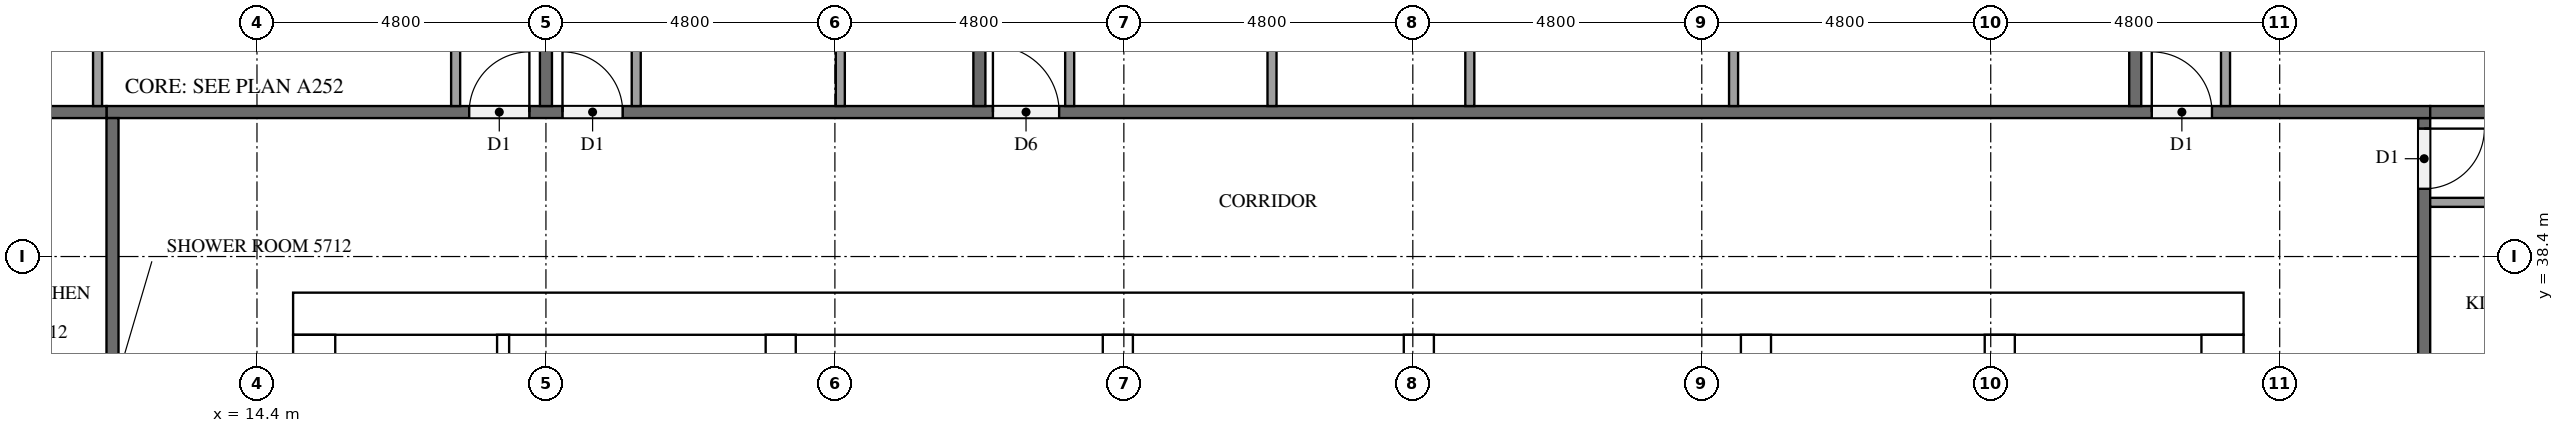
"""IFC4 building model, lengths in metres.
Left out: names, types, materials, properties, quantities, classifications, styles, units other than length and angle.
Written with IfcOpenShell. Run it as: python <this file> out.ifc"""

import sys

from ifc_helpers import new_model, si_unit, direction, frame, frame_2d, origin, place, context, subcontext, project, spatial, rectangle, extrude, element, fill, save


model = new_model("IFC4")
c1 = context("Model", 3, precision=1e-05, world=origin(), true_north=direction((0.0, 1.0)))
c2 = subcontext(c1, "Body", "Model", "MODEL_VIEW")
j1 = project(units=[si_unit("LENGTHUNIT", "METRE"), si_unit("PLANEANGLEUNIT", "RADIAN")], contexts=[c1])
p1 = place(None, origin())
s1 = spatial("IfcSite", under=j1, at=p1, CompositionType="ELEMENT")
p2 = place(p1, origin())
s2 = spatial("IfcBuilding", under=s1, at=p2, CompositionType="ELEMENT")
p3 = place(p2, frame((0.0, 0.0, 219.3)))
s3 = spatial("IfcBuildingStorey", under=s2, at=p3, CompositionType="ELEMENT", Elevation=219.3)
p4 = place(p3, frame((15.0, 37.45, 0.0), z_axis=(0.0, 0.0, 1.0), x_axis=(1.0, 0.0, 0.0)))
e1 = element("IfcWall", 1, at=p4, inside=s3, PredefinedType="SHEAR", context=c2, shape_type="SweptSolid", body=[
    extrude(rectangle(XDim=32.4, YDim=0.7, at=frame_2d((16.2, 0.0))), origin(), (0.0, 0.0, 1.0), 3.2),
])
p5 = place(p4, frame((15.3, 0.0, 0.0)))
e2 = element("IfcOpeningElement", 2, at=p5, cuts=e1, PredefinedType="OPENING", context=c2, shape_type="SweptSolid", body=[
    extrude(rectangle(XDim=1.8, YDim=2.1, at=frame_2d((0.9, 1.05))), frame((0.0, 0.36, 0.0), z_axis=(0.0, -1.0, 0.0), x_axis=(1.0, 0.0, 0.0)), (0.0, 0.0, 1.0), 0.72),
])
p6 = place(p4, frame((1.544, 0.0, 0.0)))
e3 = element("IfcOpeningElement", 3, at=p6, cuts=e1, PredefinedType="OPENING", context=c2, shape_type="SweptSolid", body=[
    extrude(rectangle(XDim=1.0, YDim=2.1, at=frame_2d((0.5, 1.05))), frame((0.0, 0.36, 0.0), z_axis=(0.0, -1.0, 0.0), x_axis=(1.0, 0.0, 0.0)), (0.0, 0.0, 1.0), 0.72),
])
p7 = place(p4, frame((5.219, 0.0, 0.0)))
e4 = element("IfcOpeningElement", 4, at=p7, cuts=e1, PredefinedType="OPENING", context=c2, shape_type="SweptSolid", body=[
    extrude(rectangle(XDim=1.0, YDim=2.1, at=frame_2d((0.5, 1.05))), frame((0.0, 0.36, 0.0), z_axis=(0.0, -1.0, 0.0), x_axis=(1.0, 0.0, 0.0)), (0.0, 0.0, 1.0), 0.72),
])
p8 = place(p3, frame((15.35, 15.7, 0.0), z_axis=(0.0, 0.0, 1.0), x_axis=(0.0, 1.0, 0.0)))
e5 = element("IfcWall", 5, at=p8, inside=s3, PredefinedType="SHEAR", context=c2, shape_type="SweptSolid", body=[
    extrude(rectangle(XDim=21.4, YDim=0.7, at=frame_2d((10.7, 0.0))), origin(), (0.0, 0.0, 1.0), 3.2),
])
p9 = place(p8, frame((5.06, 0.0, 0.0)))
e6 = element("IfcOpeningElement", 6, at=p9, cuts=e5, PredefinedType="OPENING", context=c2, shape_type="SweptSolid", body=[
    extrude(rectangle(XDim=1.2, YDim=2.1, at=frame_2d((0.6, 1.05))), frame((0.0, 0.36, 0.0), z_axis=(0.0, -1.0, 0.0), x_axis=(1.0, 0.0, 0.0)), (0.0, 0.0, 1.0), 0.72),
])
p10 = place(p3, frame((47.05, 15.7, 0.0), z_axis=(0.0, 0.0, 1.0), x_axis=(0.0, 1.0, 0.0)))
e7 = element("IfcWall", 7, at=p10, inside=s3, PredefinedType="SHEAR", context=c2, shape_type="SweptSolid", body=[
    extrude(rectangle(XDim=21.4, YDim=0.7, at=frame_2d((10.7, 0.0))), origin(), (0.0, 0.0, 1.0), 3.2),
])
p11 = place(p10, frame((10.4, 0.0, 0.0)))
e8 = element("IfcOpeningElement", 8, at=p11, cuts=e7, PredefinedType="OPENING", context=c2, shape_type="SweptSolid", body=[
    extrude(rectangle(XDim=1.2, YDim=2.1, at=frame_2d((0.6, 1.05))), frame((0.0, 0.36, 0.0), z_axis=(0.0, -1.0, 0.0), x_axis=(1.0, 0.0, 0.0)), (0.0, 0.0, 1.0), 0.72),
])
p12 = place(p3, frame((23.1, 15.7, 0.0), z_axis=(0.0, 0.0, 1.0), x_axis=(0.0, 1.0, 0.0)))
e9 = element("IfcWall", 9, at=p12, inside=s3, PredefinedType="SHEAR", context=c2, shape_type="SweptSolid", body=[
    extrude(rectangle(XDim=21.4, YDim=0.5, at=frame_2d((10.7, 0.0))), origin(), (0.0, 0.0, 1.0), 3.2),
])
p13 = place(p3, frame((39.3, 27.75, 0.0), z_axis=(0.0, 0.0, 1.0), x_axis=(0.0, 1.0, 0.0)))
e10 = element("IfcWall", 10, at=p13, inside=s3, PredefinedType="SHEAR", context=c2, shape_type="SweptSolid", body=[
    extrude(rectangle(XDim=9.35, YDim=0.5, at=frame_2d((4.675, 0.0))), origin(), (0.0, 0.0, 1.0), 3.2),
])
p14 = place(p3, frame((43.35, 27.75, 0.0), z_axis=(0.0, 0.0, 1.0), x_axis=(0.0, 1.0, 0.0)))
e11 = element("IfcWall", 11, at=p14, inside=s3, PredefinedType="SHEAR", context=c2, shape_type="SweptSolid", body=[
    extrude(rectangle(XDim=9.35, YDim=0.5, at=frame_2d((4.675, 0.0))), origin(), (0.0, 0.0, 1.0), 3.2),
])
p15 = place(p14, frame((7.65, 0.0, 0.0)))
e12 = element("IfcOpeningElement", 12, at=p15, cuts=e11, PredefinedType="OPENING", context=c2, shape_type="SweptSolid", body=[
    extrude(rectangle(XDim=1.2, YDim=2.1, at=frame_2d((0.6, 1.05))), frame((0.0, 0.26, 0.0), z_axis=(0.0, -1.0, 0.0), x_axis=(1.0, 0.0, 0.0)), (0.0, 0.0, 1.0), 0.52),
])
for number, where, z_axis, x_axis in (
    (13, (28.7, 33.8, 0.0), (0.0, 0.0, 1.0), (0.0, 1.0, 0.0)),
    (14, (33.7, 33.8, 0.0), (0.0, 0.0, 1.0), (0.0, 1.0, 0.0)),
):
    element("IfcWall", number, at=place(p3, frame(where, z_axis=z_axis, x_axis=x_axis)), inside=s3, PredefinedType="SHEAR", context=c2, shape_type="SweptSolid", body=[
        extrude(rectangle(XDim=3.3, YDim=0.5, at=frame_2d((1.65, 0.0))), origin(), (0.0, 0.0, 1.0), 3.2),
    ])
p16 = place(p3, frame((18.489, 31.5, 0.0), z_axis=(0.0, 0.0, 1.0), x_axis=(0.0, 1.0, 0.0)))
e15 = element("IfcWall", 15, at=p16, inside=s3, PredefinedType="PARTITIONING", context=c2, shape_type="SweptSolid", body=[
    extrude(rectangle(XDim=5.6, YDim=0.2, at=frame_2d((2.8, 0.0))), origin(), (0.0, 0.0, 1.0), 3.2),
])
p17 = place(p3, frame((50.4, 40.7, 0.0), z_axis=(0.0, 0.0, 1.0), x_axis=(0.0, -1.0, 0.0)))
e16 = element("IfcWall", 16, at=p17, inside=s3, PredefinedType="PARTITIONING", context=c2, shape_type="SweptSolid", body=[
    extrude(rectangle(XDim=28.6, YDim=0.2, at=frame_2d((14.3, 0.0))), origin(), (0.0, 0.0, 1.0), 3.2),
])
p18 = place(p17, frame((21.775, 0.0, 0.0)))
e17 = element("IfcOpeningElement", 17, at=p18, cuts=e16, PredefinedType="OPENING", context=c2, shape_type="SweptSolid", body=[
    extrude(rectangle(XDim=1.0, YDim=2.1, at=frame_2d((0.5, 1.05))), frame((0.0, 0.11, 0.0), z_axis=(0.0, -1.0, 0.0), x_axis=(1.0, 0.0, 0.0)), (0.0, 0.0, 1.0), 0.22),
])
p19 = place(p17, frame((7.375, 0.0, 0.0)))
e18 = element("IfcOpeningElement", 18, at=p19, cuts=e16, PredefinedType="OPENING", context=c2, shape_type="SweptSolid", body=[
    extrude(rectangle(XDim=1.0, YDim=2.1, at=frame_2d((0.5, 1.05))), frame((0.0, 0.11, 0.0), z_axis=(0.0, -1.0, 0.0), x_axis=(1.0, 0.0, 0.0)), (0.0, 0.0, 1.0), 0.22),
])
p20 = place(p17, frame((0.175, 0.0, 0.0)))
e19 = element("IfcOpeningElement", 19, at=p20, cuts=e16, PredefinedType="OPENING", context=c2, shape_type="SweptSolid", body=[
    extrude(rectangle(XDim=1.0, YDim=2.1, at=frame_2d((0.5, 1.05))), frame((0.0, 0.11, 0.0), z_axis=(0.0, -1.0, 0.0), x_axis=(1.0, 0.0, 0.0)), (0.0, 0.0, 1.0), 0.22),
])
p21 = place(p3, frame((11.9, 40.8, 0.0), z_axis=(0.0, 0.0, 1.0), x_axis=(1.0, 0.0, 0.0)))
e20 = element("IfcWall", 20, at=p21, inside=s3, PredefinedType="PARTITIONING", context=c2, shape_type="SweptSolid", body=[
    extrude(rectangle(XDim=38.6, YDim=0.2, at=frame_2d((19.3, 0.0))), origin(), (0.0, 0.0, 1.0), 3.2),
])
p22 = place(p21, frame((33.975, 0.0, 0.0)))
e21 = element("IfcOpeningElement", 21, at=p22, cuts=e20, PredefinedType="OPENING", context=c2, shape_type="SweptSolid", body=[
    extrude(rectangle(XDim=1.0, YDim=2.1, at=frame_2d((0.5, 1.05))), frame((0.0, 0.11, 0.0), z_axis=(0.0, -1.0, 0.0), x_axis=(1.0, 0.0, 0.0)), (0.0, 0.0, 1.0), 0.22),
])
p23 = place(p21, frame((14.725, 0.0, 0.0)))
e22 = element("IfcOpeningElement", 22, at=p23, cuts=e20, PredefinedType="OPENING", context=c2, shape_type="SweptSolid", body=[
    extrude(rectangle(XDim=1.1, YDim=2.1, at=frame_2d((0.55, 1.05))), frame((0.0, 0.11, 0.0), z_axis=(0.0, -1.0, 0.0), x_axis=(1.0, 0.0, 0.0)), (0.0, 0.0, 1.0), 0.22),
])
p24 = place(p21, frame((7.575, 0.0, 0.0)))
e23 = element("IfcOpeningElement", 23, at=p24, cuts=e20, PredefinedType="OPENING", context=c2, shape_type="SweptSolid", body=[
    extrude(rectangle(XDim=1.0, YDim=2.1, at=frame_2d((0.5, 1.05))), frame((0.0, 0.11, 0.0), z_axis=(0.0, -1.0, 0.0), x_axis=(1.0, 0.0, 0.0)), (0.0, 0.0, 1.0), 0.22),
])
p25 = place(p21, frame((6.025, 0.0, 0.0)))
e24 = element("IfcOpeningElement", 24, at=p25, cuts=e20, PredefinedType="OPENING", context=c2, shape_type="SweptSolid", body=[
    extrude(rectangle(XDim=1.0, YDim=2.1, at=frame_2d((0.5, 1.05))), frame((0.0, 0.11, 0.0), z_axis=(0.0, -1.0, 0.0), x_axis=(1.0, 0.0, 0.0)), (0.0, 0.0, 1.0), 0.22),
])
p26 = place(p3, frame((12.0, 12.1, 0.0), z_axis=(0.0, 0.0, 1.0), x_axis=(0.0, 1.0, 0.0)))
e25 = element("IfcWall", 25, at=p26, inside=s3, PredefinedType="PARTITIONING", context=c2, shape_type="SweptSolid", body=[
    extrude(rectangle(XDim=28.6, YDim=0.2, at=frame_2d((14.3, 0.0))), origin(), (0.0, 0.0, 1.0), 3.2),
])
p27 = place(p26, frame((9.725, 0.0, 0.0)))
e26 = element("IfcOpeningElement", 26, at=p27, cuts=e25, PredefinedType="OPENING", context=c2, shape_type="SweptSolid", body=[
    extrude(rectangle(XDim=1.1, YDim=2.1, at=frame_2d((0.55, 1.05))), frame((0.0, 0.11, 0.0), z_axis=(0.0, -1.0, 0.0), x_axis=(1.0, 0.0, 0.0)), (0.0, 0.0, 1.0), 0.22),
])
p28 = place(p26, frame((0.175, 0.0, 0.0)))
e27 = element("IfcOpeningElement", 27, at=p28, cuts=e25, PredefinedType="OPENING", context=c2, shape_type="SweptSolid", body=[
    extrude(rectangle(XDim=1.0, YDim=2.1, at=frame_2d((0.5, 1.05))), frame((0.0, 0.11, 0.0), z_axis=(0.0, -1.0, 0.0), x_axis=(1.0, 0.0, 0.0)), (0.0, 0.0, 1.0), 0.22),
])
for number, where, z_axis, x_axis in (
    (28, (50.5, 40.8, 0.0), (0.0, 0.0, 1.0), (1.0, 0.0, 0.0)),
    (29, (45.6, 52.7, 0.0), (0.0, 0.0, 1.0), (0.0, -1.0, 0.0)),
    (30, (26.4, 52.7, 0.0), (0.0, 0.0, 1.0), (0.0, -1.0, 0.0)),
):
    element("IfcWall", number, at=place(p3, frame(where, z_axis=z_axis, x_axis=x_axis)), inside=s3, PredefinedType="PARTITIONING", context=c2, shape_type="SweptSolid", body=[
        extrude(rectangle(XDim=11.8, YDim=0.2, at=frame_2d((5.9, 0.0))), origin(), (0.0, 0.0, 1.0), 3.2),
    ])
p29 = place(p3, frame((19.2, 52.475, 0.0), z_axis=(0.0, 0.0, 1.0), x_axis=(0.0, -1.0, 0.0)))
e31 = element("IfcWall", 31, at=p29, inside=s3, PredefinedType="PARTITIONING", context=c2, shape_type="SweptSolid", body=[
    extrude(rectangle(XDim=11.575, YDim=0.2, at=frame_2d((5.788, 0.0))), origin(), (0.0, 0.0, 1.0), 3.2),
])
p30 = place(p3, frame((4.9, 40.8, 0.0), z_axis=(0.0, 0.0, 1.0), x_axis=(1.0, 0.0, 0.0)))
e32 = element("IfcWall", 32, at=p30, inside=s3, PredefinedType="PARTITIONING", context=c2, shape_type="SweptSolid", body=[
    extrude(rectangle(XDim=7.0, YDim=0.2, at=frame_2d((3.5, 0.0))), origin(), (0.0, 0.0, 1.0), 3.2),
])
p31 = place(p3, frame((50.5, 39.3, 0.0), z_axis=(0.0, 0.0, 1.0), x_axis=(1.0, 0.0, 0.0)))
e33 = element("IfcWall", 33, at=p31, inside=s3, PredefinedType="PARTITIONING", context=c2, shape_type="SweptSolid", body=[
    extrude(rectangle(XDim=3.425, YDim=0.15, at=frame_2d((1.712, 0.0))), origin(), (0.0, 0.0, 1.0), 3.2),
])
p32 = place(p3, frame((47.1, 40.9, 0.0), z_axis=(0.0, 0.0, 1.0), x_axis=(0.0, 1.0, 0.0)))
e34 = element("IfcWall", 34, at=p32, inside=s3, PredefinedType="PARTITIONING", context=c2, shape_type="SweptSolid", body=[
    extrude(rectangle(XDim=3.125, YDim=0.15, at=frame_2d((1.562, 0.0))), origin(), (0.0, 0.0, 1.0), 3.2),
])
for number, where, z_axis, x_axis in (
    (35, (31.261, 40.9, 0.0), (0.0, 0.0, 1.0), (0.0, 1.0, 0.0)),
    (36, (34.547, 40.9, 0.0), (0.0, 0.0, 1.0), (0.0, 1.0, 0.0)),
    (37, (38.928, 40.9, 0.0), (0.0, 0.0, 1.0), (0.0, 1.0, 0.0)),
):
    element("IfcWall", number, at=place(p3, frame(where, z_axis=z_axis, x_axis=x_axis)), inside=s3, PredefinedType="PARTITIONING", context=c2, shape_type="SweptSolid", body=[
        extrude(rectangle(XDim=3.575, YDim=0.15, at=frame_2d((1.788, 0.0))), origin(), (0.0, 0.0, 1.0), 3.2),
    ])
for number, where, z_axis, x_axis in (
    (38, (27.9, 40.9, 0.0), (0.0, 0.0, 1.0), (0.0, 1.0, 0.0)),
    (39, (24.09, 40.9, 0.0), (0.0, 0.0, 1.0), (0.0, 1.0, 0.0)),
):
    element("IfcWall", number, at=place(p3, frame(where, z_axis=z_axis, x_axis=x_axis)), inside=s3, PredefinedType="PARTITIONING", context=c2, shape_type="SweptSolid", body=[
        extrude(rectangle(XDim=3.725, YDim=0.15, at=frame_2d((1.863, 0.0))), origin(), (0.0, 0.0, 1.0), 3.2),
    ])
p33 = place(p3, frame((20.7, 40.9, 0.0), z_axis=(0.0, 0.0, 1.0), x_axis=(0.0, 1.0, 0.0)))
e40 = element("IfcWall", 40, at=p33, inside=s3, PredefinedType="PARTITIONING", context=c2, shape_type="SweptSolid", body=[
    extrude(rectangle(XDim=3.875, YDim=0.15, at=frame_2d((1.938, 0.0))), origin(), (0.0, 0.0, 1.0), 3.2),
])
p34 = place(p3, frame((11.752, 40.9, 0.0), z_axis=(0.0, 0.0, 1.0), x_axis=(0.0, 1.0, 0.0)))
e41 = element("IfcWall", 41, at=p34, inside=s3, PredefinedType="PARTITIONING", context=c2, shape_type="SweptSolid", body=[
    extrude(rectangle(XDim=2.975, YDim=0.15, at=frame_2d((1.488, 0.0))), origin(), (0.0, 0.0, 1.0), 3.2),
])
p35 = place(p3, frame((17.7, 40.9, 0.0), z_axis=(0.0, 0.0, 1.0), x_axis=(0.0, 1.0, 0.0)))
e42 = element("IfcWall", 42, at=p35, inside=s3, PredefinedType="PARTITIONING", context=c2, shape_type="SweptSolid", body=[
    extrude(rectangle(XDim=3.125, YDim=0.15, at=frame_2d((1.562, 0.0))), origin(), (0.0, 0.0, 1.0), 3.2),
])
p36 = place(p5, origin())
e43 = element("IfcDoor", 43, at=p36, inside=s3, OperationType="DOUBLE_DOOR_SINGLE_SWING", PredefinedType="DOOR", context=c2, shape_type="SweptSolid", body=[
    extrude(rectangle(XDim=1.8, YDim=2.1, at=frame_2d((0.9, 1.05))), frame((0.0, 0.025, 0.0), z_axis=(0.0, -1.0, 0.0), x_axis=(1.0, 0.0, 0.0)), (0.0, 0.0, 1.0), 0.05),
])
fill(e2, e43)
p37 = place(p6, origin())
e44 = element("IfcDoor", 44, at=p37, inside=s3, OperationType="SINGLE_SWING_RIGHT", PredefinedType="DOOR", context=c2, shape_type="SweptSolid", body=[
    extrude(rectangle(XDim=1.0, YDim=2.1, at=frame_2d((0.5, 1.05))), frame((0.0, 0.025, 0.0), z_axis=(0.0, -1.0, 0.0), x_axis=(1.0, 0.0, 0.0)), (0.0, 0.0, 1.0), 0.05),
])
fill(e3, e44)
p38 = place(p7, origin())
e45 = element("IfcDoor", 45, at=p38, inside=s3, OperationType="SINGLE_SWING_LEFT", PredefinedType="DOOR", context=c2, shape_type="SweptSolid", body=[
    extrude(rectangle(XDim=1.0, YDim=2.1, at=frame_2d((0.5, 1.05))), frame((0.0, 0.025, 0.0), z_axis=(0.0, -1.0, 0.0), x_axis=(1.0, 0.0, 0.0)), (0.0, 0.0, 1.0), 0.05),
])
fill(e4, e45)
p39 = place(p20, origin())
e46 = element("IfcDoor", 46, at=p39, inside=s3, OperationType="SINGLE_SWING_LEFT", PredefinedType="DOOR", context=c2, shape_type="SweptSolid", body=[
    extrude(rectangle(XDim=1.0, YDim=2.1, at=frame_2d((0.5, 1.05))), frame((0.0, 0.025, 0.0), z_axis=(0.0, -1.0, 0.0), x_axis=(1.0, 0.0, 0.0)), (0.0, 0.0, 1.0), 0.05),
])
fill(e19, e46)
p40 = place(p22, origin())
e47 = element("IfcDoor", 47, at=p40, inside=s3, OperationType="SINGLE_SWING_LEFT", PredefinedType="DOOR", context=c2, shape_type="SweptSolid", body=[
    extrude(rectangle(XDim=1.0, YDim=2.1, at=frame_2d((0.5, 1.05))), frame((0.0, 0.025, 0.0), z_axis=(0.0, -1.0, 0.0), x_axis=(1.0, 0.0, 0.0)), (0.0, 0.0, 1.0), 0.05),
])
fill(e21, e47)
p41 = place(p23, origin())
e48 = element("IfcDoor", 48, at=p41, inside=s3, OperationType="SINGLE_SWING_LEFT", PredefinedType="DOOR", context=c2, shape_type="SweptSolid", body=[
    extrude(rectangle(XDim=1.1, YDim=2.1, at=frame_2d((0.55, 1.05))), frame((0.0, 0.025, 0.0), z_axis=(0.0, -1.0, 0.0), x_axis=(1.0, 0.0, 0.0)), (0.0, 0.0, 1.0), 0.05),
])
fill(e22, e48)
p42 = place(p24, origin())
e49 = element("IfcDoor", 49, at=p42, inside=s3, OperationType="SINGLE_SWING_LEFT", PredefinedType="DOOR", context=c2, shape_type="SweptSolid", body=[
    extrude(rectangle(XDim=1.0, YDim=2.1, at=frame_2d((0.5, 1.05))), frame((0.0, 0.025, 0.0), z_axis=(0.0, -1.0, 0.0), x_axis=(1.0, 0.0, 0.0)), (0.0, 0.0, 1.0), 0.05),
])
fill(e23, e49)
p43 = place(p25, origin())
e50 = element("IfcDoor", 50, at=p43, inside=s3, OperationType="SINGLE_SWING_RIGHT", PredefinedType="DOOR", context=c2, shape_type="SweptSolid", body=[
    extrude(rectangle(XDim=1.0, YDim=2.1, at=frame_2d((0.5, 1.05))), frame((0.0, 0.025, 0.0), z_axis=(0.0, -1.0, 0.0), x_axis=(1.0, 0.0, 0.0)), (0.0, 0.0, 1.0), 0.05),
])
fill(e24, e50)
save(model, sys.argv[1])
